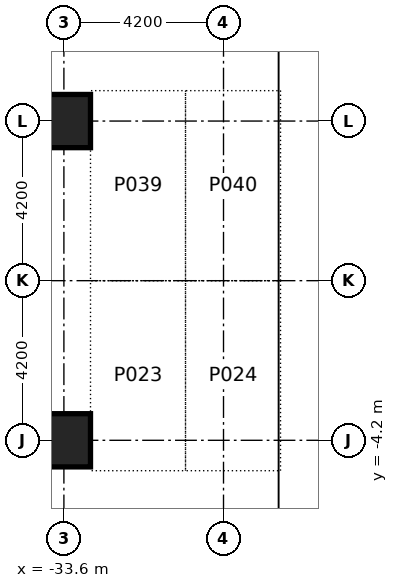
"""IFC4 building model, lengths in metres.
Left out: names, types, materials, properties, quantities, classifications, styles, units other than length and angle.
Written with IfcOpenShell. Run it as: python <this file> out.ifc"""

import sys

from ifc_helpers import new_model, si_unit, direction, frame, origin, origin_2d, place, context, subcontext, project, spatial, rectangle, extrude, element, save


model = new_model("IFC4")
c1 = context("Model", 3, precision=1e-05, world=origin(), true_north=direction((0.0, 1.0)))
c2 = subcontext(c1, "Body", "Model", "MODEL_VIEW")
j1 = project(units=[si_unit("LENGTHUNIT", "METRE"), si_unit("PLANEANGLEUNIT", "RADIAN")], contexts=[c1])
p1 = place(None, origin())
s1 = spatial("IfcSite", under=j1, at=p1, CompositionType="ELEMENT")
p2 = place(p1, origin())
s2 = spatial("IfcBuilding", under=s1, at=p2, CompositionType="ELEMENT")
p3 = place(p2, frame((0.0, 0.0, -8.4)))
s3 = spatial("IfcBuildingStorey", under=s2, at=p3, CompositionType="ELEMENT", Elevation=-8.4)
for number, where, z_axis, x_axis in (
    (1, (-33.6, -4.2, -0.5), (0.0, 0.0, 1.0), (1.0, 0.0, 0.0)),
    (2, (-33.6, 4.2, -0.5), (0.0, 0.0, 1.0), (1.0, 0.0, 0.0)),
):
    element("IfcColumn", number, at=place(p3, frame(where, z_axis=z_axis, x_axis=x_axis)), inside=s3, PredefinedType="COLUMN", context=c2, shape_type="SweptSolid", body=[
        extrude(rectangle(XDim=1.4, YDim=1.4, at=origin_2d()), origin(), (0.0, 0.0, 1.0), 4.7),
    ])
save(model, sys.argv[1])
